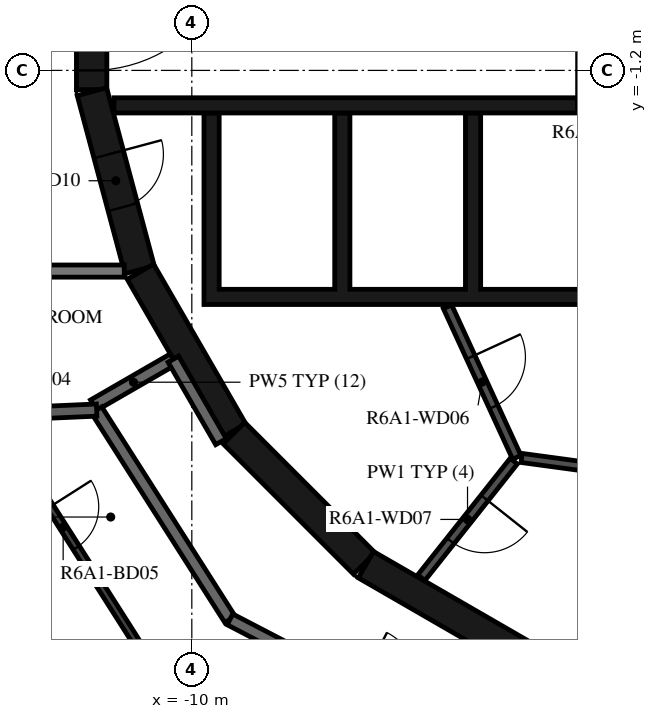
"""IFC4 building model, lengths in metres.
Left out: names, types, materials, properties, quantities, classifications, styles, units other than length and angle.
Written with IfcOpenShell. Run it as: python <this file> out.ifc"""

import sys

from ifc_helpers import new_model, si_unit, direction, frame, frame_2d, origin, place, context, subcontext, project, spatial, polyline, rectangle, outline, extrude, element, fill, save


model = new_model("IFC4")
c1 = context("Model", 3, precision=1e-05, world=origin(), true_north=direction((0.0, 1.0)))
c2 = subcontext(c1, "Body", "Model", "MODEL_VIEW")
j1 = project(units=[si_unit("LENGTHUNIT", "METRE"), si_unit("PLANEANGLEUNIT", "RADIAN")], contexts=[c1])
p1 = place(None, origin())
s1 = spatial("IfcSite", under=j1, at=p1, CompositionType="ELEMENT")
p2 = place(p1, origin())
s2 = spatial("IfcBuilding", under=s1, at=p2, CompositionType="ELEMENT")
p3 = place(p2, frame((0.0, 0.0, 230.2)))
s3 = spatial("IfcBuildingStorey", under=s2, at=p3, CompositionType="ELEMENT", Elevation=230.2)
p4 = place(p3, frame((-11.647, 1.516, 0.0), z_axis=(0.0, 0.0, 1.0), x_axis=(0.0, -1.0, 0.0)))
e1 = element("IfcWall", 1, at=p4, inside=s3, PredefinedType="SHEAR", context=c2, shape_type="SweptSolid", body=[
    extrude(rectangle(XDim=3.033, YDim=0.5, at=frame_2d((1.516, 0.0))), origin(), (0.0, 0.0, 1.0), 3.12),
])
p5 = place(p4, frame((0.316, 0.0, 0.0)))
e2 = element("IfcOpeningElement", 2, at=p5, cuts=e1, PredefinedType="OPENING", context=c2, shape_type="SweptSolid", body=[
    extrude(rectangle(XDim=2.4, YDim=2.1, at=frame_2d((1.2, 1.05))), frame((0.0, 0.26, 0.0), z_axis=(0.0, -1.0, 0.0), x_axis=(1.0, 0.0, 0.0)), (0.0, 0.0, 1.0), 0.52),
])
p6 = place(p3, frame((-11.643, -1.55, 0.0), z_axis=(0.0, 0.0, 1.0), x_axis=(0.258734743916, -0.965948410781, 0.0)))
e3 = element("IfcWall", 3, at=p6, inside=s3, PredefinedType="SHEAR", context=c2, shape_type="SweptSolid", body=[
    extrude(rectangle(XDim=3.033, YDim=0.5, at=frame_2d((1.516, 0.0))), origin(), (0.0, 0.0, 1.0), 3.12),
])
p7 = place(p6, frame((1.066, 0.0, 0.0)))
e4 = element("IfcOpeningElement", 4, at=p7, cuts=e3, PredefinedType="OPENING", context=c2, shape_type="SweptSolid", body=[
    extrude(rectangle(XDim=0.9, YDim=2.1, at=frame_2d((0.45, 1.05))), frame((0.0, 0.26, 0.0), z_axis=(0.0, -1.0, 0.0), x_axis=(1.0, 0.0, 0.0)), (0.0, 0.0, 1.0), 0.52),
])
p8 = place(p3, frame((-10.845, -4.51, 0.0), z_axis=(0.0, 0.0, 1.0), x_axis=(0.500087131594, -0.865975092491, 0.0)))
e5 = element("IfcWall", 5, at=p8, inside=s3, PredefinedType="SHEAR", context=c2, shape_type="SweptSolid", body=[
    extrude(rectangle(XDim=3.033, YDim=0.5, at=frame_2d((1.516, 0.0))), origin(), (0.0, 0.0, 1.0), 3.12),
])
p9 = place(p3, frame((-9.308, -7.164, 0.0), z_axis=(0.0, 0.0, 1.0), x_axis=(0.707106781187, -0.707106781187, 0.0)))
e6 = element("IfcWall", 6, at=p9, inside=s3, PredefinedType="SHEAR", context=c2, shape_type="SweptSolid", body=[
    extrude(rectangle(XDim=3.032, YDim=0.5, at=frame_2d((1.516, 0.0))), origin(), (0.0, 0.0, 1.0), 3.12),
])
p10 = place(p3, frame((-7.137, -9.329, 0.0), z_axis=(0.0, 0.0, 1.0), x_axis=(0.865975092491, -0.500087131594, 0.0)))
e7 = element("IfcWall", 7, at=p10, inside=s3, PredefinedType="SHEAR", context=c2, shape_type="SweptSolid", body=[
    extrude(rectangle(XDim=3.033, YDim=0.5, at=frame_2d((1.516, 0.0))), origin(), (0.0, 0.0, 1.0), 3.12),
])
p11 = place(p3, origin())
e8 = element("IfcWall", 8, at=p11, inside=s3, PredefinedType="SHEAR", context=c2, shape_type="SweptSolid", body=[
    extrude(outline(polyline([(9.8, -5.05), (9.8, -4.8), (9.8, -1.9), (9.55, -1.9), (9.55, -4.8), (7.65, -4.8), (7.65, -1.9), (7.4, -1.9), (7.4, -4.8), (5.5, -4.8), (5.5, -1.9), (5.25, -1.9), (5.25, -4.8), (3.35, -4.8), (3.35, -1.9), (3.1, -1.9), (3.1, -4.8), (1.2, -4.8), (1.2, -1.9), (0.95, -1.9), (0.95, -4.8), (-0.95, -4.8), (-0.95, -1.9), (-1.2, -1.9), (-1.2, -4.8), (-5.25, -4.8), (-5.25, -1.9), (-5.5, -1.9), (-5.5, -4.8), (-7.4, -4.8), (-7.4, -1.9), (-7.65, -1.9), (-7.65, -4.8), (-9.55, -4.8), (-9.55, -1.9), (-9.8, -1.9), (-9.8, -4.8), (-9.8, -5.05), (9.8, -5.05)])), origin(), (0.0, 0.0, 1.0), 3.12),
])
p12 = place(p3, frame((-11.28, -1.775, 0.0), z_axis=(0.0, 0.0, 1.0), x_axis=(1.0, 0.0, 0.0)))
e9 = element("IfcWall", 9, at=p12, inside=s3, PredefinedType="SHEAR", context=c2, shape_type="SweptSolid", body=[
    extrude(rectangle(XDim=14.38, YDim=0.25, at=frame_2d((7.19, 0.0))), origin(), (0.0, 0.0, 1.0), 3.12),
])
p13 = place(p12, frame((12.88, 0.0, 0.0)))
e10 = element("IfcOpeningElement", 10, at=p13, cuts=e9, PredefinedType="OPENING", context=c2, shape_type="SweptSolid", body=[
    extrude(rectangle(XDim=1.1, YDim=2.1, at=frame_2d((0.55, 1.05))), frame((0.0, 0.135, 0.0), z_axis=(0.0, -1.0, 0.0), x_axis=(1.0, 0.0, 0.0)), (0.0, 0.0, 1.0), 0.27),
])
p14 = place(p12, frame((7.605, 0.0, 0.0)))
e11 = element("IfcOpeningElement", 11, at=p14, cuts=e9, PredefinedType="OPENING", context=c2, shape_type="SweptSolid", body=[
    extrude(rectangle(XDim=0.9, YDim=2.1, at=frame_2d((0.45, 1.05))), frame((0.0, 0.135, 0.0), z_axis=(0.0, -1.0, 0.0), x_axis=(1.0, 0.0, 0.0)), (0.0, 0.0, 1.0), 0.27),
])
p15 = place(p12, frame((10.83, 0.0, 0.0)))
e12 = element("IfcOpeningElement", 12, at=p15, cuts=e9, PredefinedType="OPENING", context=c2, shape_type="SweptSolid", body=[
    extrude(rectangle(XDim=0.9, YDim=2.1, at=frame_2d((0.45, 1.05))), frame((0.0, 0.135, 0.0), z_axis=(0.0, -1.0, 0.0), x_axis=(1.0, 0.0, 0.0)), (0.0, 0.0, 1.0), 0.27),
])
p16 = place(p3, frame((-5.795, -5.086, 0.0), z_axis=(0.0, 0.0, 1.0), x_axis=(0.417887867606, -0.908498613157, 0.0)))
e13 = element("IfcWall", 13, at=p16, inside=s3, PredefinedType="PARTITIONING", context=c2, shape_type="SweptSolid", body=[
    extrude(rectangle(XDim=2.726, YDim=0.15, at=frame_2d((1.363, 0.0))), origin(), (0.0, 0.0, 1.0), 3.12),
])
p17 = place(p16, frame((0.913, 0.0, 0.0)))
e14 = element("IfcOpeningElement", 14, at=p17, cuts=e13, PredefinedType="OPENING", context=c2, shape_type="SweptSolid", body=[
    extrude(rectangle(XDim=0.9, YDim=2.1, at=frame_2d((0.45, 1.05))), frame((0.0, 0.085, 0.0), z_axis=(0.0, -1.0, 0.0), x_axis=(1.0, 0.0, 0.0)), (0.0, 0.0, 1.0), 0.17),
])
p18 = place(p3, frame((-4.706, -7.625, 0.0), z_axis=(0.0, 0.0, 1.0), x_axis=(-0.621392599334, -0.783499353856, 0.0)))
e15 = element("IfcWall", 15, at=p18, inside=s3, PredefinedType="PARTITIONING", context=c2, shape_type="SweptSolid", body=[
    extrude(rectangle(XDim=2.447, YDim=0.15, at=frame_2d((1.224, 0.0))), origin(), (0.0, 0.0, 1.0), 3.12),
])
p19 = place(p18, frame((0.774, 0.0, 0.0)))
e16 = element("IfcOpeningElement", 16, at=p19, cuts=e15, PredefinedType="OPENING", context=c2, shape_type="SweptSolid", body=[
    extrude(rectangle(XDim=0.9, YDim=2.1, at=frame_2d((0.45, 1.05))), frame((0.0, 0.085, 0.0), z_axis=(0.0, -1.0, 0.0), x_axis=(1.0, 0.0, 0.0)), (0.0, 0.0, 1.0), 0.17),
])
p20 = place(p3, frame((-2.42, -7.865, 0.0), z_axis=(0.0, 0.0, 1.0), x_axis=(-0.990972299108, 0.134066783362, 0.0)))
e17 = element("IfcWall", 17, at=p20, inside=s3, PredefinedType="PARTITIONING", context=c2, shape_type="SweptSolid", body=[
    extrude(rectangle(XDim=2.176, YDim=0.15, at=frame_2d((1.088, 0.0))), origin(), (0.0, 0.0, 1.0), 3.12),
])
p21 = place(p3, frame((-10.303, -5.949, 0.0), z_axis=(0.0, 0.0, 1.0), x_axis=(-0.866043382451, -0.499968858743, 0.0)))
e18 = element("IfcWall", 18, at=p21, inside=s3, PredefinedType="STANDARD", context=c2, shape_type="SweptSolid", body=[
    extrude(rectangle(XDim=1.515, YDim=0.2, at=frame_2d((0.758, 0.0))), origin(), (0.0, 0.0, 1.0), 3.12),
])
p22 = place(p3, frame((-9.52, -7.305, 0.0), z_axis=(0.0, 0.0, 1.0), x_axis=(-0.500028278809, 0.866009076391, 0.0)))
e19 = element("IfcWall", 19, at=p22, inside=s3, PredefinedType="STANDARD", context=c2, shape_type="SweptSolid", body=[
    extrude(rectangle(XDim=1.566, YDim=0.2, at=frame_2d((0.783, 0.0))), origin(), (0.0, 0.0, 1.0), 3.12),
])
p23 = place(p3, frame((-11.565, -6.786, 0.0), z_axis=(0.0, 0.0, 1.0), x_axis=(0.537297327359, -0.843392898958, 0.0)))
e20 = element("IfcWall", 20, at=p23, inside=s3, PredefinedType="STANDARD", context=c2, shape_type="SweptSolid", body=[
    extrude(rectangle(XDim=4.081, YDim=0.2, at=frame_2d((2.041, 0.0))), origin(), (0.0, 0.0, 1.0), 3.12),
])
p24 = place(p3, frame((-9.372, -10.228, 0.0), z_axis=(0.0, 0.0, 1.0), x_axis=(0.887005184532, -0.461759464021, 0.0)))
e21 = element("IfcWall", 21, at=p24, inside=s3, PredefinedType="STANDARD", context=c2, shape_type="SweptSolid", body=[
    extrude(rectangle(XDim=7.181, YDim=0.2, at=frame_2d((3.591, 0.0))), origin(), (0.0, 0.0, 1.0), 3.12),
])
p25 = place(p24, frame((2.391, 0.0, 0.0)))
e22 = element("IfcOpeningElement", 22, at=p25, cuts=e21, PredefinedType="OPENING", context=c2, shape_type="SweptSolid", body=[
    extrude(rectangle(XDim=1.0, YDim=2.1, at=frame_2d((0.5, 1.05))), frame((0.0, 0.11, 0.0), z_axis=(0.0, -1.0, 0.0), x_axis=(1.0, 0.0, 0.0)), (0.0, 0.0, 1.0), 0.22),
])
p26 = place(p3, frame((-17.655, -4.5, 0.0), z_axis=(0.0, 0.0, 1.0), x_axis=(1.0, 0.0, 0.0)))
e23 = element("IfcWall", 23, at=p26, inside=s3, PredefinedType="STANDARD", context=c2, shape_type="SweptSolid", body=[
    extrude(rectangle(XDim=6.543, YDim=0.2, at=frame_2d((3.272, 0.0))), origin(), (0.0, 0.0, 1.0), 3.12),
])
p27 = place(p3, frame((-13.148, -6.855, 0.0), z_axis=(0.0, 0.0, 1.0), x_axis=(0.999048583464, 0.043611098121, 0.0)))
e24 = element("IfcWall", 24, at=p27, inside=s3, PredefinedType="STANDARD", context=c2, shape_type="SweptSolid", body=[
    extrude(rectangle(XDim=1.584, YDim=0.2, at=frame_2d((0.792, 0.0))), origin(), (0.0, 0.0, 1.0), 3.12),
])
p28 = place(p3, frame((-13.137, -7.111, 0.0), z_axis=(0.0, 0.0, 1.0), x_axis=(0.537300549444, -0.843390846267, 0.0)))
e25 = element("IfcWall", 25, at=p28, inside=s3, PredefinedType="PARTITIONING", context=c2, shape_type="SweptSolid", body=[
    extrude(rectangle(XDim=5.054, YDim=0.12, at=frame_2d((2.527, 0.0))), origin(), (0.0, 0.0, 1.0), 3.12),
])
p29 = place(p28, frame((1.5, 0.0, 0.0)))
e26 = element("IfcOpeningElement", 26, at=p29, cuts=e25, PredefinedType="OPENING", context=c2, shape_type="SweptSolid", body=[
    extrude(rectangle(XDim=0.8, YDim=2.1, at=frame_2d((0.4, 1.05))), frame((0.0, 0.07, 0.0), z_axis=(0.0, -1.0, 0.0), x_axis=(1.0, 0.0, 0.0)), (0.0, 0.0, 1.0), 0.14),
])
p30 = place(p5, origin())
e27 = element("IfcDoor", 27, at=p30, inside=s3, OperationType="DOUBLE_DOOR_SINGLE_SWING", PredefinedType="DOOR", context=c2, shape_type="SweptSolid", body=[
    extrude(rectangle(XDim=2.4, YDim=2.1, at=frame_2d((1.2, 1.05))), frame((0.0, 0.025, 0.0), z_axis=(0.0, -1.0, 0.0), x_axis=(1.0, 0.0, 0.0)), (0.0, 0.0, 1.0), 0.05),
])
fill(e2, e27)
p31 = place(p14, origin())
e28 = element("IfcDoor", 28, at=p31, inside=s3, OperationType="SINGLE_SWING_RIGHT", PredefinedType="DOOR", context=c2, shape_type="SweptSolid", body=[
    extrude(rectangle(XDim=0.9, YDim=2.1, at=frame_2d((0.45, 1.05))), frame((0.0, 0.025, 0.0), z_axis=(0.0, -1.0, 0.0), x_axis=(1.0, 0.0, 0.0)), (0.0, 0.0, 1.0), 0.05),
])
fill(e11, e28)
p32 = place(p17, origin())
e29 = element("IfcDoor", 29, at=p32, inside=s3, OperationType="SINGLE_SWING_RIGHT", PredefinedType="DOOR", context=c2, shape_type="SweptSolid", body=[
    extrude(rectangle(XDim=0.9, YDim=2.1, at=frame_2d((0.45, 1.05))), frame((0.0, 0.025, 0.0), z_axis=(0.0, -1.0, 0.0), x_axis=(1.0, 0.0, 0.0)), (0.0, 0.0, 1.0), 0.05),
])
fill(e14, e29)
p33 = place(p19, origin())
e30 = element("IfcDoor", 30, at=p33, inside=s3, OperationType="SINGLE_SWING_LEFT", PredefinedType="DOOR", context=c2, shape_type="SweptSolid", body=[
    extrude(rectangle(XDim=0.9, YDim=2.1, at=frame_2d((0.45, 1.05))), frame((0.0, 0.025, 0.0), z_axis=(0.0, -1.0, 0.0), x_axis=(1.0, 0.0, 0.0)), (0.0, 0.0, 1.0), 0.05),
])
fill(e16, e30)
p34 = place(p7, origin())
e31 = element("IfcDoor", 31, at=p34, inside=s3, OperationType="SINGLE_SWING_RIGHT", PredefinedType="DOOR", context=c2, shape_type="SweptSolid", body=[
    extrude(rectangle(XDim=0.9, YDim=2.1, at=frame_2d((0.45, 1.05))), frame((0.0, 0.025, 0.0), z_axis=(0.0, -1.0, 0.0), x_axis=(1.0, 0.0, 0.0)), (0.0, 0.0, 1.0), 0.05),
])
fill(e4, e31)
p35 = place(p29, origin())
e32 = element("IfcDoor", 32, at=p35, inside=s3, OperationType="SINGLE_SWING_RIGHT", PredefinedType="DOOR", context=c2, shape_type="SweptSolid", body=[
    extrude(rectangle(XDim=0.8, YDim=2.1, at=frame_2d((0.4, 1.05))), frame((0.0, 0.025, 0.0), z_axis=(0.0, -1.0, 0.0), x_axis=(1.0, 0.0, 0.0)), (0.0, 0.0, 1.0), 0.05),
])
fill(e26, e32)
save(model, sys.argv[1])
